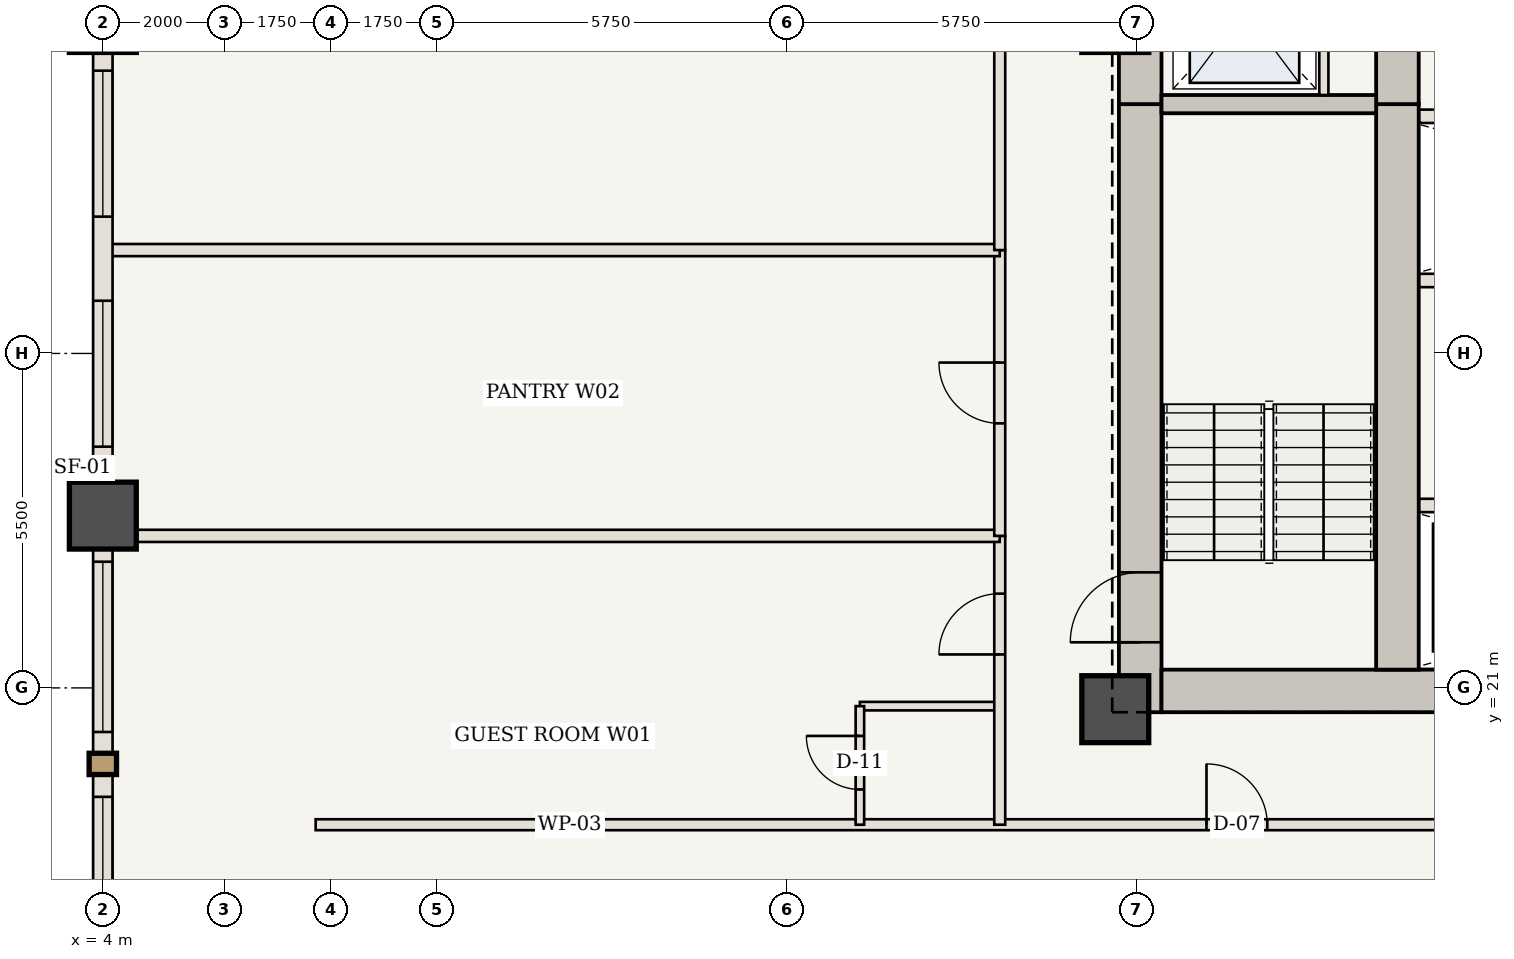
"""IFC4 building model, lengths in metres.
Left out: names, types, materials, properties, quantities, classifications, styles, units other than length and angle.
Written with IfcOpenShell. Run it as: python <this file> out.ifc"""

import sys

from ifc_helpers import new_model, si_unit, direction, frame, frame_2d, origin, origin_2d, place, context, subcontext, project, spatial, rectangle, extrude, element, fill, save


model = new_model("IFC4")
c1 = context("Model", 3, precision=1e-05, world=origin(), true_north=direction((0.0, 1.0)))
c2 = subcontext(c1, "Body", "Model", "MODEL_VIEW")
j1 = project(units=[si_unit("LENGTHUNIT", "METRE"), si_unit("PLANEANGLEUNIT", "RADIAN")], contexts=[c1])
p1 = place(None, origin())
s1 = spatial("IfcSite", under=j1, at=p1, CompositionType="ELEMENT")
p2 = place(p1, origin())
s2 = spatial("IfcBuilding", under=s1, at=p2, CompositionType="ELEMENT")
p3 = place(p2, frame((0.0, 0.0, 85.75)))
s3 = spatial("IfcBuildingStorey", under=s2, at=p3, CompositionType="ELEMENT", Elevation=85.75)
p4 = place(p3, frame((21.06, 20.6, 0.0), z_axis=(0.0, 0.0, 1.0), x_axis=(0.0, 1.0, 0.0)))
e1 = element("IfcWall", 1, at=p4, inside=s3, PredefinedType="SHEAR", context=c2, shape_type="SweptSolid", body=[
    extrude(rectangle(XDim=10.0, YDim=0.7, at=frame_2d((5.0, 0.0))), origin(), (0.0, 0.0, 1.0), 3.5),
])
p5 = place(p4, frame((1.15, 0.0, 0.0)))
e2 = element("IfcOpeningElement", 2, at=p5, cuts=e1, PredefinedType="OPENING", context=c2, shape_type="SweptSolid", body=[
    extrude(rectangle(XDim=1.15, YDim=2.15, at=frame_2d((0.575, 1.075))), frame((0.0, 0.36, 0.0), z_axis=(0.0, -1.0, 0.0), x_axis=(1.0, 0.0, 0.0)), (0.0, 0.0, 1.0), 0.72),
])
p6 = place(p3, frame((21.06, 30.6, 0.0), z_axis=(0.0, 0.0, 1.0), x_axis=(0.0, 1.0, 0.0)))
e3 = element("IfcWall", 3, at=p6, inside=s3, PredefinedType="SHEAR", context=c2, shape_type="SweptSolid", body=[
    extrude(rectangle(XDim=12.75, YDim=0.7, at=frame_2d((6.375, 0.0))), origin(), (0.0, 0.0, 1.0), 3.5),
])
p7 = place(p6, frame((4.2, 0.0, 0.0)))
e4 = element("IfcOpeningElement", 4, at=p7, cuts=e3, PredefinedType="OPENING", context=c2, shape_type="SweptSolid", body=[
    extrude(rectangle(XDim=1.1, YDim=2.15, at=frame_2d((0.55, 1.075))), frame((0.0, 0.36, 0.0), z_axis=(0.0, -1.0, 0.0), x_axis=(1.0, 0.0, 0.0)), (0.0, 0.0, 1.0), 0.72),
])
p8 = place(p6, frame((9.2, 0.0, 0.0)))
e5 = element("IfcOpeningElement", 5, at=p8, cuts=e3, PredefinedType="OPENING", context=c2, shape_type="SweptSolid", body=[
    extrude(rectangle(XDim=0.92, YDim=2.1, at=frame_2d((0.46, 1.05))), frame((0.0, 0.36, 0.0), z_axis=(0.0, -1.0, 0.0), x_axis=(1.0, 0.0, 0.0)), (0.0, 0.0, 1.0), 0.72),
])
p9 = place(p3, frame((21.41, 20.95, 0.0), z_axis=(0.0, 0.0, 1.0), x_axis=(1.0, 0.0, 0.0)))
e6 = element("IfcWall", 6, at=p9, inside=s3, PredefinedType="SHEAR", context=c2, shape_type="SweptSolid", body=[
    extrude(rectangle(XDim=13.74, YDim=0.7, at=frame_2d((6.87, 0.0))), origin(), (0.0, 0.0, 1.0), 3.5),
])
p10 = place(p3, frame((25.29, 21.3, 0.0), z_axis=(0.0, 0.0, 1.0), x_axis=(0.0, 1.0, 0.0)))
e7 = element("IfcWall", 7, at=p10, inside=s3, PredefinedType="SHEAR", context=c2, shape_type="SweptSolid", body=[
    extrude(rectangle(XDim=9.3, YDim=0.7, at=frame_2d((4.65, 0.0))), origin(), (0.0, 0.0, 1.0), 3.5),
])
p11 = place(p3, frame((25.29, 30.6, 0.0), z_axis=(0.0, 0.0, 1.0), x_axis=(0.0, 1.0, 0.0)))
e8 = element("IfcWall", 8, at=p11, inside=s3, PredefinedType="SHEAR", context=c2, shape_type="SweptSolid", body=[
    extrude(rectangle(XDim=12.05, YDim=0.7, at=frame_2d((6.025, 0.0))), origin(), (0.0, 0.0, 1.0), 3.5),
])
p12 = place(p11, frame((6.25, 0.0, 0.0)))
e9 = element("IfcOpeningElement", 9, at=p12, cuts=e8, PredefinedType="OPENING", context=c2, shape_type="SweptSolid", body=[
    extrude(rectangle(XDim=1.1, YDim=2.15, at=frame_2d((0.55, 1.075))), frame((0.0, 0.36, 0.0), z_axis=(0.0, -1.0, 0.0), x_axis=(1.0, 0.0, 0.0)), (0.0, 0.0, 1.0), 0.72),
])
for number, where, z_axis, x_axis in (
    (10, (20.65, 20.65, 0.0), (0.0, 0.0, 1.0), (1.0, 0.0, 0.0)),
    (11, (4.0, 23.833, 0.0), (0.0, 0.0, 1.0), (1.0, 0.0, 0.0)),
):
    element("IfcColumn", number, at=place(p3, frame(where, z_axis=z_axis, x_axis=x_axis)), inside=s3, PredefinedType="COLUMN", context=c2, shape_type="SweptSolid", body=[
        extrude(rectangle(XDim=1.1, YDim=1.1, at=origin_2d()), origin(), (0.0, 0.0, 1.0), 3.5),
    ])
p13 = place(p3, frame((21.41, 30.6, 0.0), z_axis=(0.0, 0.0, 1.0), x_axis=(1.0, 0.0, 0.0)))
e12 = element("IfcWall", 12, at=p13, inside=s3, PredefinedType="SHEAR", context=c2, shape_type="SweptSolid", body=[
    extrude(rectangle(XDim=3.53, YDim=0.3, at=frame_2d((1.765, 0.0))), origin(), (0.0, 0.0, 1.0), 3.32),
])
p14 = place(p3, frame((24.08, 30.75, 0.0), z_axis=(0.0, 0.0, 1.0), x_axis=(0.0, 1.0, 0.0)))
e13 = element("IfcWall", 13, at=p14, inside=s3, PredefinedType="STANDARD", context=c2, shape_type="SweptSolid", body=[
    extrude(rectangle(XDim=2.65, YDim=0.15, at=frame_2d((1.325, 0.0))), origin(), (0.0, 0.0, 1.0), 3.32),
])
p15 = place(p3, frame((25.65, 24.0, 0.0), z_axis=(0.0, 0.0, 1.0), x_axis=(1.0, 0.0, 0.0)))
e14 = element("IfcWall", 14, at=p15, inside=s3, PredefinedType="STANDARD", context=c2, shape_type="SweptSolid", body=[
    extrude(rectangle(XDim=9.25, YDim=0.22, at=frame_2d((4.625, 0.0))), origin(), (0.0, 0.0, 1.0), 3.32),
])
p16 = place(p15, frame((0.58, 0.0, 0.0)))
e15 = element("IfcOpeningElement", 15, at=p16, cuts=e14, PredefinedType="OPENING", context=c2, shape_type="SweptSolid", body=[
    extrude(rectangle(XDim=1.1, YDim=2.15, at=frame_2d((0.55, 1.075))), frame((0.0, 0.12, 0.0), z_axis=(0.0, -1.0, 0.0), x_axis=(1.0, 0.0, 0.0)), (0.0, 0.0, 1.0), 0.24),
])
p17 = place(p15, frame((2.75, 0.0, 0.0)))
e16 = element("IfcOpeningElement", 16, at=p17, cuts=e14, PredefinedType="OPENING", context=c2, shape_type="SweptSolid", body=[
    extrude(rectangle(XDim=1.1, YDim=2.15, at=frame_2d((0.55, 1.075))), frame((0.0, 0.12, 0.0), z_axis=(0.0, -1.0, 0.0), x_axis=(1.0, 0.0, 0.0)), (0.0, 0.0, 1.0), 0.24),
])
p18 = place(p15, frame((5.05, 0.0, 0.0)))
e17 = element("IfcOpeningElement", 17, at=p18, cuts=e14, PredefinedType="OPENING", context=c2, shape_type="SweptSolid", body=[
    extrude(rectangle(XDim=1.1, YDim=2.15, at=frame_2d((0.55, 1.075))), frame((0.0, 0.12, 0.0), z_axis=(0.0, -1.0, 0.0), x_axis=(1.0, 0.0, 0.0)), (0.0, 0.0, 1.0), 0.24),
])
p19 = place(p15, frame((7.35, 0.0, 0.0)))
e18 = element("IfcOpeningElement", 18, at=p19, cuts=e14, PredefinedType="OPENING", context=c2, shape_type="SweptSolid", body=[
    extrude(rectangle(XDim=1.1, YDim=2.15, at=frame_2d((0.55, 1.075))), frame((0.0, 0.12, 0.0), z_axis=(0.0, -1.0, 0.0), x_axis=(1.0, 0.0, 0.0)), (0.0, 0.0, 1.0), 0.24),
])
for number, where, z_axis, x_axis in (
    (19, (25.65, 27.7, 0.0), (0.0, 0.0, 1.0), (1.0, 0.0, 0.0)),
    (20, (25.65, 30.4, 0.0), (0.0, 0.0, 1.0), (1.0, 0.0, 0.0)),
):
    element("IfcWall", number, at=place(p3, frame(where, z_axis=z_axis, x_axis=x_axis)), inside=s3, PredefinedType="STANDARD", context=c2, shape_type="SweptSolid", body=[
        extrude(rectangle(XDim=9.25, YDim=0.22, at=frame_2d((4.625, 0.0))), origin(), (0.0, 0.0, 1.0), 3.32),
    ])
p20 = place(p3, frame((7.5, 18.75, 0.0), z_axis=(0.0, 0.0, 1.0), x_axis=(1.0, 0.0, 0.0)))
e21 = element("IfcWall", 21, at=p20, inside=s3, PredefinedType="STANDARD", context=c2, shape_type="SweptSolid", body=[
    extrude(rectangle(XDim=19.0, YDim=0.18, at=frame_2d((9.5, 0.0))), origin(), (0.0, 0.0, 1.0), 3.32),
])
p21 = place(p20, frame((14.65, 0.0, 0.0)))
e22 = element("IfcOpeningElement", 22, at=p21, cuts=e21, PredefinedType="OPENING", context=c2, shape_type="SweptSolid", body=[
    extrude(rectangle(XDim=1.0, YDim=2.15, at=frame_2d((0.5, 1.075))), frame((0.0, 0.1, 0.0), z_axis=(0.0, -1.0, 0.0), x_axis=(1.0, 0.0, 0.0)), (0.0, 0.0, 1.0), 0.2),
])
p22 = place(p3, frame((16.45, 20.7, 0.0), z_axis=(0.0, 0.0, 1.0), x_axis=(1.0, 0.0, 0.0)))
e23 = element("IfcWall", 23, at=p22, inside=s3, PredefinedType="STANDARD", context=c2, shape_type="SweptSolid", body=[
    extrude(rectangle(XDim=2.3, YDim=0.14, at=frame_2d((1.15, 0.0))), origin(), (0.0, 0.0, 1.0), 2.615),
])
p23 = place(p3, frame((16.45, 18.75, 0.0), z_axis=(0.0, 0.0, 1.0), x_axis=(0.0, 1.0, 0.0)))
e24 = element("IfcWall", 24, at=p23, inside=s3, PredefinedType="STANDARD", context=c2, shape_type="SweptSolid", body=[
    extrude(rectangle(XDim=1.95, YDim=0.14, at=frame_2d((0.975, 0.0))), origin(), (0.0, 0.0, 1.0), 3.32),
])
p24 = place(p23, frame((0.58, 0.0, 0.0)))
e25 = element("IfcOpeningElement", 25, at=p24, cuts=e24, PredefinedType="OPENING", context=c2, shape_type="SweptSolid", body=[
    extrude(rectangle(XDim=0.88, YDim=2.1, at=frame_2d((0.44, 1.05))), frame((0.0, 0.08, 0.0), z_axis=(0.0, -1.0, 0.0), x_axis=(1.0, 0.0, 0.0)), (0.0, 0.0, 1.0), 0.16),
])
p25 = place(p3, frame((18.75, 18.75, 0.0), z_axis=(0.0, 0.0, 1.0), x_axis=(0.0, 1.0, 0.0)))
e26 = element("IfcWall", 26, at=p25, inside=s3, PredefinedType="STANDARD", context=c2, shape_type="SweptSolid", body=[
    extrude(rectangle(XDim=4.75, YDim=0.18, at=frame_2d((2.375, 0.0))), origin(), (0.0, 0.0, 1.0), 3.32),
])
p26 = place(p25, frame((2.8, 0.0, 0.0)))
e27 = element("IfcOpeningElement", 27, at=p26, cuts=e26, PredefinedType="OPENING", context=c2, shape_type="SweptSolid", body=[
    extrude(rectangle(XDim=1.0, YDim=2.15, at=frame_2d((0.5, 1.075))), frame((0.0, 0.1, 0.0), z_axis=(0.0, -1.0, 0.0), x_axis=(1.0, 0.0, 0.0)), (0.0, 0.0, 1.0), 0.2),
])
p27 = place(p3, frame((4.06, 23.5, 0.0), z_axis=(0.0, 0.0, 1.0), x_axis=(1.0, 0.0, 0.0)))
e28 = element("IfcWall", 28, at=p27, inside=s3, PredefinedType="STANDARD", context=c2, shape_type="SweptSolid", body=[
    extrude(rectangle(XDim=14.69, YDim=0.2, at=frame_2d((7.345, 0.0))), origin(), (0.0, 0.0, 1.0), 3.32),
])
p28 = place(p3, frame((18.75, 23.5, 0.0), z_axis=(0.0, 0.0, 1.0), x_axis=(0.0, 1.0, 0.0)))
e29 = element("IfcWall", 29, at=p28, inside=s3, PredefinedType="STANDARD", context=c2, shape_type="SweptSolid", body=[
    extrude(rectangle(XDim=4.7, YDim=0.18, at=frame_2d((2.35, 0.0))), origin(), (0.0, 0.0, 1.0), 3.32),
])
p29 = place(p28, frame((1.85, 0.0, 0.0)))
e30 = element("IfcOpeningElement", 30, at=p29, cuts=e29, PredefinedType="OPENING", context=c2, shape_type="SweptSolid", body=[
    extrude(rectangle(XDim=1.0, YDim=2.15, at=frame_2d((0.5, 1.075))), frame((0.0, 0.1, 0.0), z_axis=(0.0, -1.0, 0.0), x_axis=(1.0, 0.0, 0.0)), (0.0, 0.0, 1.0), 0.2),
])
p30 = place(p3, frame((4.06, 28.2, 0.0), z_axis=(0.0, 0.0, 1.0), x_axis=(1.0, 0.0, 0.0)))
e31 = element("IfcWall", 31, at=p30, inside=s3, PredefinedType="STANDARD", context=c2, shape_type="SweptSolid", body=[
    extrude(rectangle(XDim=14.69, YDim=0.2, at=frame_2d((7.345, 0.0))), origin(), (0.0, 0.0, 1.0), 3.32),
])
p31 = place(p3, frame((18.75, 28.2, 0.0), z_axis=(0.0, 0.0, 1.0), x_axis=(0.0, 1.0, 0.0)))
e32 = element("IfcWall", 32, at=p31, inside=s3, PredefinedType="STANDARD", context=c2, shape_type="SweptSolid", body=[
    extrude(rectangle(XDim=9.6, YDim=0.18, at=frame_2d((4.8, 0.0))), origin(), (0.0, 0.0, 1.0), 3.32),
])
p32 = place(p31, frame((5.75, 0.0, 0.0)))
e33 = element("IfcOpeningElement", 33, at=p32, cuts=e32, PredefinedType="OPENING", context=c2, shape_type="SweptSolid", body=[
    extrude(rectangle(XDim=1.0, YDim=2.15, at=frame_2d((0.5, 1.075))), frame((0.0, 0.1, 0.0), z_axis=(0.0, -1.0, 0.0), x_axis=(1.0, 0.0, 0.0)), (0.0, 0.0, 1.0), 0.2),
])
p33 = place(p3, frame((4.0, 15.667, 0.0), z_axis=(0.0, 0.0, 1.0), x_axis=(0.0, 1.0, 0.0)))
e34 = element("IfcWall", 34, at=p33, inside=s3, PredefinedType="USERDEFINED", context=c2, shape_type="SweptSolid", body=[
    extrude(rectangle(XDim=8.167, YDim=0.32, at=frame_2d((4.083, 0.0))), origin(), (0.0, 0.0, 1.0), 2.52),
])
p34 = place(p33, frame((0.742, 0.0, 0.85)))
e35 = element("IfcOpeningElement", 35, at=p34, cuts=e34, PredefinedType="OPENING", context=c2, shape_type="SweptSolid", body=[
    extrude(rectangle(XDim=2.8, YDim=1.47, at=frame_2d((1.4, 0.735))), frame((0.0, 0.17, 0.0), z_axis=(0.0, -1.0, 0.0), x_axis=(1.0, 0.0, 0.0)), (0.0, 0.0, 1.0), 0.34),
])
p35 = place(p33, frame((4.608, 0.0, 0.85)))
e36 = element("IfcOpeningElement", 36, at=p35, cuts=e34, PredefinedType="OPENING", context=c2, shape_type="SweptSolid", body=[
    extrude(rectangle(XDim=2.8, YDim=1.47, at=frame_2d((1.4, 0.735))), frame((0.0, 0.17, 0.0), z_axis=(0.0, -1.0, 0.0), x_axis=(1.0, 0.0, 0.0)), (0.0, 0.0, 1.0), 0.34),
])
p36 = place(p3, frame((4.0, 23.833, 0.0), z_axis=(0.0, 0.0, 1.0), x_axis=(0.0, 1.0, 0.0)))
e37 = element("IfcWall", 37, at=p36, inside=s3, PredefinedType="USERDEFINED", context=c2, shape_type="SweptSolid", body=[
    extrude(rectangle(XDim=8.167, YDim=0.32, at=frame_2d((4.083, 0.0))), origin(), (0.0, 0.0, 1.0), 2.52),
])
p37 = place(p36, frame((1.133, 0.0, 0.85)))
e38 = element("IfcOpeningElement", 38, at=p37, cuts=e37, PredefinedType="OPENING", context=c2, shape_type="SweptSolid", body=[
    extrude(rectangle(XDim=2.4, YDim=1.47, at=frame_2d((1.2, 0.735))), frame((0.0, 0.17, 0.0), z_axis=(0.0, -1.0, 0.0), x_axis=(1.0, 0.0, 0.0)), (0.0, 0.0, 1.0), 0.34),
])
p38 = place(p36, frame((4.917, 0.0, 0.85)))
e39 = element("IfcOpeningElement", 39, at=p38, cuts=e37, PredefinedType="OPENING", context=c2, shape_type="SweptSolid", body=[
    extrude(rectangle(XDim=2.4, YDim=1.47, at=frame_2d((1.2, 0.735))), frame((0.0, 0.17, 0.0), z_axis=(0.0, -1.0, 0.0), x_axis=(1.0, 0.0, 0.0)), (0.0, 0.0, 1.0), 0.34),
])
p39 = place(p5, origin())
e40 = element("IfcDoor", 40, at=p39, inside=s3, OperationType="SINGLE_SWING_LEFT", PredefinedType="DOOR", context=c2, shape_type="SweptSolid", body=[
    extrude(rectangle(XDim=1.15, YDim=2.15, at=frame_2d((0.575, 1.075))), frame((0.0, 0.025, 0.0), z_axis=(0.0, -1.0, 0.0), x_axis=(1.0, 0.0, 0.0)), (0.0, 0.0, 1.0), 0.05),
])
fill(e2, e40)
p40 = place(p21, origin())
e41 = element("IfcDoor", 41, at=p40, inside=s3, OperationType="SINGLE_SWING_LEFT", PredefinedType="DOOR", context=c2, shape_type="SweptSolid", body=[
    extrude(rectangle(XDim=1.0, YDim=2.15, at=frame_2d((0.5, 1.075))), frame((0.0, 0.025, 0.0), z_axis=(0.0, -1.0, 0.0), x_axis=(1.0, 0.0, 0.0)), (0.0, 0.0, 1.0), 0.05),
])
fill(e22, e41)
p41 = place(p24, origin())
e42 = element("IfcDoor", 42, at=p41, inside=s3, OperationType="SINGLE_SWING_RIGHT", PredefinedType="DOOR", context=c2, shape_type="SweptSolid", body=[
    extrude(rectangle(XDim=0.88, YDim=2.1, at=frame_2d((0.44, 1.05))), frame((0.0, 0.025, 0.0), z_axis=(0.0, -1.0, 0.0), x_axis=(1.0, 0.0, 0.0)), (0.0, 0.0, 1.0), 0.05),
])
fill(e25, e42)
p42 = place(p26, origin())
e43 = element("IfcDoor", 43, at=p42, inside=s3, OperationType="SINGLE_SWING_LEFT", PredefinedType="DOOR", context=c2, shape_type="SweptSolid", body=[
    extrude(rectangle(XDim=1.0, YDim=2.15, at=frame_2d((0.5, 1.075))), frame((0.0, 0.025, 0.0), z_axis=(0.0, -1.0, 0.0), x_axis=(1.0, 0.0, 0.0)), (0.0, 0.0, 1.0), 0.05),
])
fill(e27, e43)
p43 = place(p29, origin())
e44 = element("IfcDoor", 44, at=p43, inside=s3, OperationType="SINGLE_SWING_RIGHT", PredefinedType="DOOR", context=c2, shape_type="SweptSolid", body=[
    extrude(rectangle(XDim=1.0, YDim=2.15, at=frame_2d((0.5, 1.075))), frame((0.0, 0.025, 0.0), z_axis=(0.0, -1.0, 0.0), x_axis=(1.0, 0.0, 0.0)), (0.0, 0.0, 1.0), 0.05),
])
fill(e30, e44)
p44 = place(p34, origin())
e45 = element("IfcWindow", 45, at=p44, inside=s3, PartitioningType="SINGLE_PANEL", PredefinedType="WINDOW", context=c2, shape_type="SweptSolid", body=[
    extrude(rectangle(XDim=2.8, YDim=1.47, at=frame_2d((1.4, 0.735))), frame((0.0, 0.03, 0.0), z_axis=(0.0, -1.0, 0.0), x_axis=(1.0, 0.0, 0.0)), (0.0, 0.0, 1.0), 0.06),
])
fill(e35, e45)
p45 = place(p35, origin())
e46 = element("IfcWindow", 46, at=p45, inside=s3, PartitioningType="SINGLE_PANEL", PredefinedType="WINDOW", context=c2, shape_type="SweptSolid", body=[
    extrude(rectangle(XDim=2.8, YDim=1.47, at=frame_2d((1.4, 0.735))), frame((0.0, 0.03, 0.0), z_axis=(0.0, -1.0, 0.0), x_axis=(1.0, 0.0, 0.0)), (0.0, 0.0, 1.0), 0.06),
])
fill(e36, e46)
p46 = place(p37, origin())
e47 = element("IfcWindow", 47, at=p46, inside=s3, PartitioningType="SINGLE_PANEL", PredefinedType="WINDOW", context=c2, shape_type="SweptSolid", body=[
    extrude(rectangle(XDim=2.4, YDim=1.47, at=frame_2d((1.2, 0.735))), frame((0.0, 0.03, 0.0), z_axis=(0.0, -1.0, 0.0), x_axis=(1.0, 0.0, 0.0)), (0.0, 0.0, 1.0), 0.06),
])
fill(e38, e47)
p47 = place(p38, origin())
e48 = element("IfcWindow", 48, at=p47, inside=s3, PartitioningType="SINGLE_PANEL", PredefinedType="WINDOW", context=c2, shape_type="SweptSolid", body=[
    extrude(rectangle(XDim=2.4, YDim=1.47, at=frame_2d((1.2, 0.735))), frame((0.0, 0.03, 0.0), z_axis=(0.0, -1.0, 0.0), x_axis=(1.0, 0.0, 0.0)), (0.0, 0.0, 1.0), 0.06),
])
fill(e39, e48)
save(model, sys.argv[1])
